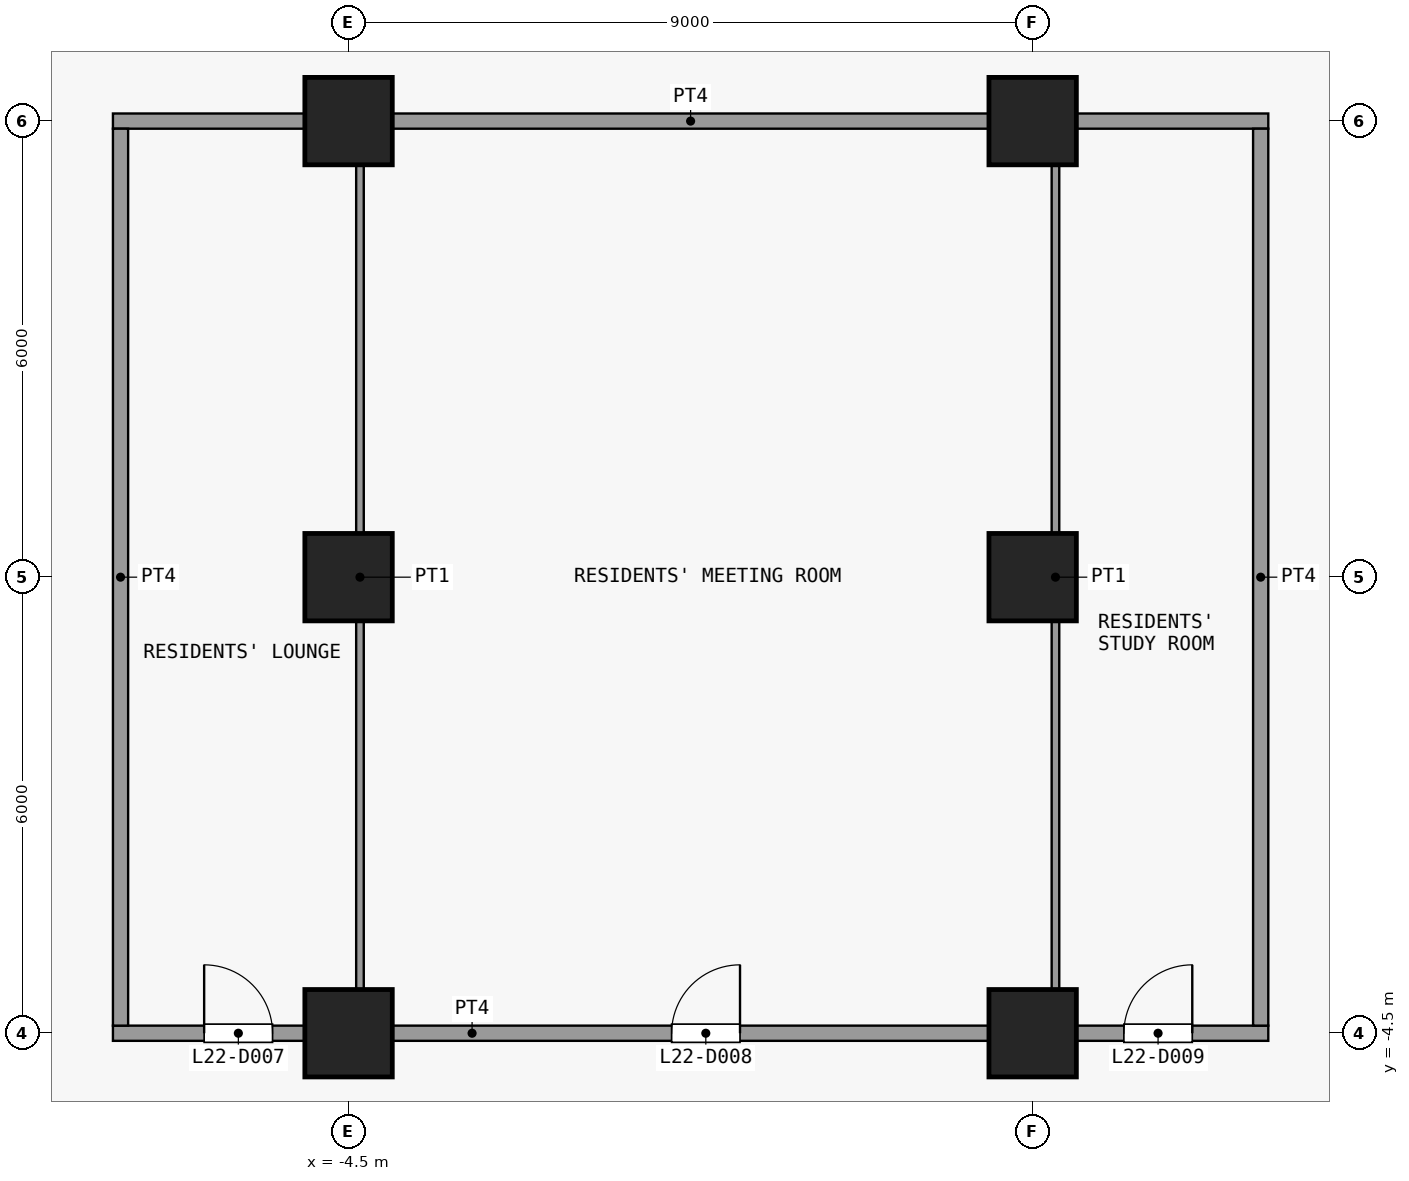
"""IFC4 building model, lengths in metres.
Left out: names, types, materials, properties, quantities, classifications, styles, units other than length and angle.
Written with IfcOpenShell. Run it as: python <this file> out.ifc"""

import sys

from ifc_helpers import new_model, si_unit, direction, frame, frame_2d, origin, origin_2d, place, context, subcontext, project, spatial, rectangle, extrude, element, fill, save


model = new_model("IFC4")
c1 = context("Model", 3, precision=1e-05, world=origin(), true_north=direction((0.0, 1.0)))
c2 = subcontext(c1, "Body", "Model", "MODEL_VIEW")
j1 = project(units=[si_unit("LENGTHUNIT", "METRE"), si_unit("PLANEANGLEUNIT", "RADIAN")], contexts=[c1])
p1 = place(None, origin())
s1 = spatial("IfcSite", under=j1, at=p1, CompositionType="ELEMENT")
p2 = place(p1, origin())
s2 = spatial("IfcBuilding", under=s1, at=p2, CompositionType="ELEMENT")
p3 = place(p2, frame((0.0, 0.0, 91.9)))
s3 = spatial("IfcBuildingStorey", under=s2, at=p3, CompositionType="ELEMENT", Elevation=91.9)
for number, where, z_axis, x_axis in (
    (1, (-4.5, -4.5, 0.0), (0.0, 0.0, 1.0), (1.0, 0.0, 0.0)),
    (2, (-4.5, 1.5, 0.0), (0.0, 0.0, 1.0), (1.0, 0.0, 0.0)),
    (3, (-4.5, 7.5, 0.0), (0.0, 0.0, 1.0), (1.0, 0.0, 0.0)),
    (4, (4.5, -4.5, 0.0), (0.0, 0.0, 1.0), (1.0, 0.0, 0.0)),
    (5, (4.5, 1.5, 0.0), (0.0, 0.0, 1.0), (1.0, 0.0, 0.0)),
    (6, (4.5, 7.5, 0.0), (0.0, 0.0, 1.0), (1.0, 0.0, 0.0)),
):
    element("IfcColumn", number, at=place(p3, frame(where, z_axis=z_axis, x_axis=x_axis)), inside=s3, PredefinedType="COLUMN", context=c2, shape_type="SweptSolid", body=[
        extrude(rectangle(XDim=1.15, YDim=1.15, at=origin_2d()), origin(), (0.0, 0.0, 1.0), 3.6),
    ])
p4 = place(p3, frame((-7.6, -4.5, 0.0), z_axis=(0.0, 0.0, 1.0), x_axis=(1.0, 0.0, 0.0)))
e7 = element("IfcWall", 7, at=p4, inside=s3, PredefinedType="PARTITIONING", context=c2, shape_type="SweptSolid", body=[
    extrude(rectangle(XDim=15.2, YDim=0.2, at=frame_2d((7.6, 0.0))), origin(), (0.0, 0.0, 1.0), 3.3),
])
p5 = place(p4, frame((1.2, 0.0, 0.0)))
e8 = element("IfcOpeningElement", 8, at=p5, cuts=e7, PredefinedType="OPENING", context=c2, shape_type="SweptSolid", body=[
    extrude(rectangle(XDim=0.9, YDim=2.1, at=frame_2d((0.45, 1.05))), frame((0.0, 0.11, 0.0), z_axis=(0.0, -1.0, 0.0), x_axis=(1.0, 0.0, 0.0)), (0.0, 0.0, 1.0), 0.22),
])
p6 = place(p4, frame((7.35, 0.0, 0.0)))
e9 = element("IfcOpeningElement", 9, at=p6, cuts=e7, PredefinedType="OPENING", context=c2, shape_type="SweptSolid", body=[
    extrude(rectangle(XDim=0.9, YDim=2.1, at=frame_2d((0.45, 1.05))), frame((0.0, 0.11, 0.0), z_axis=(0.0, -1.0, 0.0), x_axis=(1.0, 0.0, 0.0)), (0.0, 0.0, 1.0), 0.22),
])
p7 = place(p4, frame((13.3, 0.0, 0.0)))
e10 = element("IfcOpeningElement", 10, at=p7, cuts=e7, PredefinedType="OPENING", context=c2, shape_type="SweptSolid", body=[
    extrude(rectangle(XDim=0.9, YDim=2.1, at=frame_2d((0.45, 1.05))), frame((0.0, 0.11, 0.0), z_axis=(0.0, -1.0, 0.0), x_axis=(1.0, 0.0, 0.0)), (0.0, 0.0, 1.0), 0.22),
])
p8 = place(p3, frame((-7.6, 7.5, 0.0), z_axis=(0.0, 0.0, 1.0), x_axis=(1.0, 0.0, 0.0)))
e11 = element("IfcWall", 11, at=p8, inside=s3, PredefinedType="PARTITIONING", context=c2, shape_type="SweptSolid", body=[
    extrude(rectangle(XDim=15.2, YDim=0.2, at=frame_2d((7.6, 0.0))), origin(), (0.0, 0.0, 1.0), 3.3),
])
p9 = place(p3, frame((-7.5, -4.4, 0.0), z_axis=(0.0, 0.0, 1.0), x_axis=(0.0, 1.0, 0.0)))
e12 = element("IfcWall", 12, at=p9, inside=s3, PredefinedType="PARTITIONING", context=c2, shape_type="SweptSolid", body=[
    extrude(rectangle(XDim=11.8, YDim=0.2, at=frame_2d((5.9, 0.0))), origin(), (0.0, 0.0, 1.0), 3.3),
])
for number, where, z_axis, x_axis in (
    (13, (-4.35, -4.4, 0.0), (0.0, 0.0, 1.0), (0.0, 1.0, 0.0)),
    (14, (4.8, -4.4, 0.0), (0.0, 0.0, 1.0), (0.0, 1.0, 0.0)),
):
    element("IfcWall", number, at=place(p3, frame(where, z_axis=z_axis, x_axis=x_axis)), inside=s3, PredefinedType="PARTITIONING", context=c2, shape_type="SweptSolid", body=[
        extrude(rectangle(XDim=11.8, YDim=0.1, at=frame_2d((5.9, 0.0))), origin(), (0.0, 0.0, 1.0), 3.3),
    ])
p10 = place(p3, frame((7.5, -4.4, 0.0), z_axis=(0.0, 0.0, 1.0), x_axis=(0.0, 1.0, 0.0)))
e15 = element("IfcWall", 15, at=p10, inside=s3, PredefinedType="PARTITIONING", context=c2, shape_type="SweptSolid", body=[
    extrude(rectangle(XDim=11.8, YDim=0.2, at=frame_2d((5.9, 0.0))), origin(), (0.0, 0.0, 1.0), 3.3),
])
p11 = place(p5, origin())
e16 = element("IfcDoor", 16, at=p11, inside=s3, OperationType="SINGLE_SWING_RIGHT", PredefinedType="DOOR", context=c2, shape_type="SweptSolid", body=[
    extrude(rectangle(XDim=0.9, YDim=2.1, at=frame_2d((0.45, 1.05))), frame((0.0, 0.025, 0.0), z_axis=(0.0, -1.0, 0.0), x_axis=(1.0, 0.0, 0.0)), (0.0, 0.0, 1.0), 0.05),
])
fill(e8, e16)
p12 = place(p6, origin())
e17 = element("IfcDoor", 17, at=p12, inside=s3, OperationType="SINGLE_SWING_LEFT", PredefinedType="DOOR", context=c2, shape_type="SweptSolid", body=[
    extrude(rectangle(XDim=0.9, YDim=2.1, at=frame_2d((0.45, 1.05))), frame((0.0, 0.025, 0.0), z_axis=(0.0, -1.0, 0.0), x_axis=(1.0, 0.0, 0.0)), (0.0, 0.0, 1.0), 0.05),
])
fill(e9, e17)
p13 = place(p7, origin())
e18 = element("IfcDoor", 18, at=p13, inside=s3, OperationType="SINGLE_SWING_LEFT", PredefinedType="DOOR", context=c2, shape_type="SweptSolid", body=[
    extrude(rectangle(XDim=0.9, YDim=2.1, at=frame_2d((0.45, 1.05))), frame((0.0, 0.025, 0.0), z_axis=(0.0, -1.0, 0.0), x_axis=(1.0, 0.0, 0.0)), (0.0, 0.0, 1.0), 0.05),
])
fill(e10, e18)
save(model, sys.argv[1])
